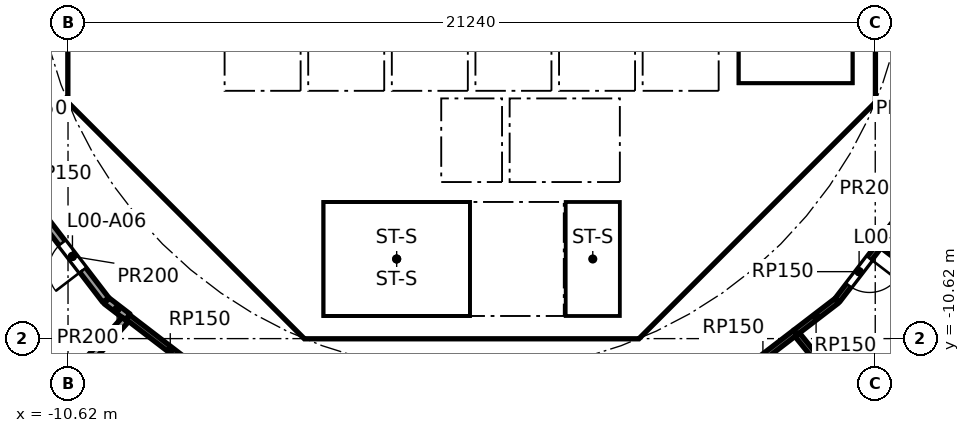
"""IFC4 building model, lengths in metres.
Left out: names, types, materials, properties, quantities, classifications, styles, units other than length and angle.
Written with IfcOpenShell. Run it as: python <this file> out.ifc"""

import sys

from ifc_helpers import new_model, si_unit, direction, frame, frame_2d, origin, place, context, subcontext, project, spatial, polyline, rectangle, outline, extrude, element, fill, save


model = new_model("IFC4")
c1 = context("Model", 3, precision=1e-05, world=origin(), true_north=direction((0.0, 1.0)))
c2 = subcontext(c1, "Body", "Model", "MODEL_VIEW")
j1 = project(units=[si_unit("LENGTHUNIT", "METRE"), si_unit("PLANEANGLEUNIT", "RADIAN")], contexts=[c1])
p1 = place(None, origin())
s1 = spatial("IfcSite", under=j1, at=p1, CompositionType="ELEMENT")
p2 = place(p1, origin())
s2 = spatial("IfcBuilding", under=s1, at=p2, CompositionType="ELEMENT")
p3 = place(p2, origin())
s3 = spatial("IfcBuildingStorey", under=s2, at=p3, CompositionType="ELEMENT", Elevation=0.0)
p4 = place(p3, frame((10.325, -3.801, 0.0), z_axis=(0.0, 0.0, 1.0), x_axis=(0.0, 1.0, 0.0)))
e1 = element("IfcWall", 1, at=p4, inside=s3, PredefinedType="SHEAR", context=c2, shape_type="SweptSolid", body=[
    extrude(rectangle(XDim=7.602, YDim=0.6, at=frame_2d((3.801, 0.0))), origin(), (0.0, 0.0, 1.0), 6.7),
])
p5 = place(p4, frame((6.351, 0.0, 0.0)))
e2 = element("IfcOpeningElement", 2, at=p5, cuts=e1, PredefinedType="OPENING", context=c2, shape_type="SweptSolid", body=[
    extrude(rectangle(XDim=1.1, YDim=2.1, at=frame_2d((0.55, 1.05))), frame((0.0, 0.31, 0.0), z_axis=(0.0, -1.0, 0.0), x_axis=(1.0, 0.0, 0.0)), (0.0, 0.0, 1.0), 0.62),
])
p6 = place(p3, frame((-10.325, 3.801, 0.0), z_axis=(0.0, 0.0, 1.0), x_axis=(0.0, -1.0, 0.0)))
e3 = element("IfcWall", 3, at=p6, inside=s3, PredefinedType="SHEAR", context=c2, shape_type="SweptSolid", body=[
    extrude(rectangle(XDim=7.602, YDim=0.6, at=frame_2d((3.801, 0.0))), origin(), (0.0, 0.0, 1.0), 6.7),
])
p7 = place(p6, frame((0.651, 0.0, 0.0)))
e4 = element("IfcOpeningElement", 4, at=p7, cuts=e3, PredefinedType="OPENING", context=c2, shape_type="SweptSolid", body=[
    extrude(rectangle(XDim=1.5, YDim=2.1, at=frame_2d((0.75, 1.05))), frame((0.0, 0.31, 0.0), z_axis=(0.0, -1.0, 0.0), x_axis=(1.0, 0.0, 0.0)), (0.0, 0.0, 1.0), 0.62),
])
p8 = place(p6, frame((5.451, 0.0, 0.0)))
e5 = element("IfcOpeningElement", 5, at=p8, cuts=e3, PredefinedType="OPENING", context=c2, shape_type="SweptSolid", body=[
    extrude(rectangle(XDim=1.5, YDim=2.1, at=frame_2d((0.75, 1.05))), frame((0.0, 0.31, 0.0), z_axis=(0.0, -1.0, 0.0), x_axis=(1.0, 0.0, 0.0)), (0.0, 0.0, 1.0), 0.62),
])
p9 = place(p3, frame((-9.988, -4.613, 0.0), z_axis=(0.0, 0.0, 1.0), x_axis=(0.707106781187, -0.707106781187, 0.0)))
e6 = element("IfcWall", 6, at=p9, inside=s3, PredefinedType="SHEAR", context=c2, shape_type="SweptSolid", body=[
    extrude(rectangle(XDim=7.602, YDim=0.6, at=frame_2d((3.801, 0.0))), origin(), (0.0, 0.0, 1.0), 6.7),
])
p10 = place(p9, frame((6.151, 0.0, 0.0)))
e7 = element("IfcOpeningElement", 7, at=p10, cuts=e6, PredefinedType="OPENING", context=c2, shape_type="SweptSolid", body=[
    extrude(rectangle(XDim=1.1, YDim=2.1, at=frame_2d((0.55, 1.05))), frame((0.0, 0.31, 0.0), z_axis=(0.0, -1.0, 0.0), x_axis=(1.0, 0.0, 0.0)), (0.0, 0.0, 1.0), 0.62),
])
p11 = place(p3, frame((-3.801, -10.325, 0.0), z_axis=(0.0, 0.0, 1.0), x_axis=(1.0, 0.0, 0.0)))
e8 = element("IfcWall", 8, at=p11, inside=s3, PredefinedType="SHEAR", context=c2, shape_type="SweptSolid", body=[
    extrude(rectangle(XDim=7.602, YDim=0.6, at=frame_2d((3.801, 0.0))), origin(), (0.0, 0.0, 1.0), 6.7),
])
p12 = place(p11, frame((6.351, 0.0, 0.0)))
e9 = element("IfcOpeningElement", 9, at=p12, cuts=e8, PredefinedType="OPENING", context=c2, shape_type="SweptSolid", body=[
    extrude(rectangle(XDim=1.1, YDim=2.1, at=frame_2d((0.55, 1.05))), frame((0.0, 0.31, 0.0), z_axis=(0.0, -1.0, 0.0), x_axis=(1.0, 0.0, 0.0)), (0.0, 0.0, 1.0), 0.62),
])
p13 = place(p3, frame((4.613, -9.988, 0.0), z_axis=(0.0, 0.0, 1.0), x_axis=(0.707106781187, 0.707106781187, 0.0)))
e10 = element("IfcWall", 10, at=p13, inside=s3, PredefinedType="SHEAR", context=c2, shape_type="SweptSolid", body=[
    extrude(rectangle(XDim=7.602, YDim=0.6, at=frame_2d((3.801, 0.0))), origin(), (0.0, 0.0, 1.0), 6.7),
])
p14 = place(p13, frame((3.201, 0.0, 0.0)))
e11 = element("IfcOpeningElement", 11, at=p14, cuts=e10, PredefinedType="OPENING", context=c2, shape_type="SweptSolid", body=[
    extrude(rectangle(XDim=1.2, YDim=2.1, at=frame_2d((0.6, 1.05))), frame((0.0, 0.31, 0.0), z_axis=(0.0, -1.0, 0.0), x_axis=(1.0, 0.0, 0.0)), (0.0, 0.0, 1.0), 0.62),
])
p15 = place(p3, frame((4.0, -10.025, 0.0), z_axis=(0.0, 0.0, 1.0), x_axis=(0.0, 1.0, 0.0)))
e12 = element("IfcWall", 12, at=p15, inside=s3, PredefinedType="SOLIDWALL", context=c2, shape_type="SweptSolid", body=[
    extrude(rectangle(XDim=3.0, YDim=0.2, at=frame_2d((1.5, 0.0))), origin(), (0.0, 0.0, 1.0), 6.7),
])
p16 = place(p15, frame((0.975, 0.0, 0.0)))
e13 = element("IfcOpeningElement", 13, at=p16, cuts=e12, PredefinedType="OPENING", context=c2, shape_type="SweptSolid", body=[
    extrude(rectangle(XDim=1.1, YDim=2.1, at=frame_2d((0.55, 1.05))), frame((0.0, 0.11, 0.0), z_axis=(0.0, -1.0, 0.0), x_axis=(1.0, 0.0, 0.0)), (0.0, 0.0, 1.0), 0.22),
])
p17 = place(p3, frame((-5.8, -8.227, 0.0), z_axis=(0.0, 0.0, 1.0), x_axis=(0.0, 1.0, 0.0)))
e14 = element("IfcWall", 14, at=p17, inside=s3, PredefinedType="PARTITIONING", context=c2, shape_type="SweptSolid", body=[
    extrude(rectangle(XDim=3.927, YDim=0.15, at=frame_2d((1.963, 0.0))), origin(), (0.0, 0.0, 1.0), 6.7),
])
p18 = place(p17, frame((2.615, 0.0, 0.0)))
e15 = element("IfcOpeningElement", 15, at=p18, cuts=e14, PredefinedType="OPENING", context=c2, shape_type="SweptSolid", body=[
    extrude(rectangle(XDim=0.9, YDim=2.1, at=frame_2d((0.45, 1.05))), frame((0.0, 0.085, 0.0), z_axis=(0.0, -1.0, 0.0), x_axis=(1.0, 0.0, 0.0)), (0.0, 0.0, 1.0), 0.17),
])
p19 = place(p17, frame((0.539, 0.0, 0.0)))
e16 = element("IfcOpeningElement", 16, at=p19, cuts=e14, PredefinedType="OPENING", context=c2, shape_type="SweptSolid", body=[
    extrude(rectangle(XDim=0.9, YDim=2.1, at=frame_2d((0.45, 1.05))), frame((0.0, 0.085, 0.0), z_axis=(0.0, -1.0, 0.0), x_axis=(1.0, 0.0, 0.0)), (0.0, 0.0, 1.0), 0.17),
])
p20 = place(p3, frame((4.0, -6.5, 0.0), z_axis=(0.0, 0.0, 1.0), x_axis=(0.0, 1.0, 0.0)))
e17 = element("IfcWall", 17, at=p20, inside=s3, PredefinedType="SOLIDWALL", context=c2, shape_type="SweptSolid", body=[
    extrude(rectangle(XDim=2.2, YDim=0.2, at=frame_2d((1.1, 0.0))), origin(), (0.0, 0.0, 1.0), 6.7),
])
p21 = place(p20, frame((0.55, 0.0, 0.0)))
e18 = element("IfcOpeningElement", 18, at=p21, cuts=e17, PredefinedType="OPENING", context=c2, shape_type="SweptSolid", body=[
    extrude(rectangle(XDim=1.1, YDim=2.1, at=frame_2d((0.55, 1.05))), frame((0.0, 0.11, 0.0), z_axis=(0.0, -1.0, 0.0), x_axis=(1.0, 0.0, 0.0)), (0.0, 0.0, 1.0), 0.22),
])
p22 = place(p3, frame((-4.0, -6.5, 0.0), z_axis=(0.0, 0.0, 1.0), x_axis=(0.0, 1.0, 0.0)))
e19 = element("IfcWall", 19, at=p22, inside=s3, PredefinedType="SOLIDWALL", context=c2, shape_type="SweptSolid", body=[
    extrude(rectangle(XDim=2.2, YDim=0.2, at=frame_2d((1.1, 0.0))), origin(), (0.0, 0.0, 1.0), 6.7),
])
p23 = place(p22, frame((0.65, 0.0, 0.0)))
e20 = element("IfcOpeningElement", 20, at=p23, cuts=e19, PredefinedType="OPENING", context=c2, shape_type="SweptSolid", body=[
    extrude(rectangle(XDim=0.9, YDim=2.1, at=frame_2d((0.45, 1.05))), frame((0.0, 0.11, 0.0), z_axis=(0.0, -1.0, 0.0), x_axis=(1.0, 0.0, 0.0)), (0.0, 0.0, 1.0), 0.22),
])
p24 = place(p3, origin())
e21 = element("IfcWall", 21, at=p24, inside=s3, PredefinedType="SHEAR", context=c2, shape_type="SweptSolid", body=[
    extrude(outline(polyline([(-10.625, -3.801), (-10.025, -3.801), (-10.025, -4.152), (-9.776, -4.401), (-10.2, -4.825), (-10.625, -4.401), (-10.625, -3.801)])), origin(), (0.0, 0.0, 1.0), 6.7),
])
p25 = place(p3, origin())
e22 = element("IfcWall", 22, at=p25, inside=s3, PredefinedType="SHEAR", context=c2, shape_type="SweptSolid", body=[
    extrude(outline(polyline([(-4.825, -10.2), (-4.401, -9.776), (-4.152, -10.025), (-3.801, -10.025), (-3.801, -10.625), (-4.401, -10.625), (-4.825, -10.2)])), origin(), (0.0, 0.0, 1.0), 6.7),
])
p26 = place(p3, origin())
e23 = element("IfcWall", 23, at=p26, inside=s3, PredefinedType="SHEAR", context=c2, shape_type="SweptSolid", body=[
    extrude(outline(polyline([(3.801, -10.625), (3.801, -10.025), (4.152, -10.025), (4.401, -9.776), (4.825, -10.2), (4.401, -10.625), (3.801, -10.625)])), origin(), (0.0, 0.0, 1.0), 6.7),
])
p27 = place(p3, origin())
e24 = element("IfcWall", 24, at=p27, inside=s3, PredefinedType="SHEAR", context=c2, shape_type="SweptSolid", body=[
    extrude(outline(polyline([(10.2, -4.825), (9.776, -4.401), (10.025, -4.152), (10.025, -3.801), (10.625, -3.801), (10.625, -4.401), (10.2, -4.825)])), origin(), (0.0, 0.0, 1.0), 6.7),
])
for number, where, z_axis, x_axis in (
    (25, (-0.9, -6.5, 0.0), (0.0, 0.0, 1.0), (0.0, 1.0, 0.0)),
    (26, (0.9, -6.5, 0.0), (0.0, 0.0, 1.0), (0.0, 1.0, 0.0)),
):
    element("IfcWall", number, at=place(p3, frame(where, z_axis=z_axis, x_axis=x_axis)), inside=s3, PredefinedType="SOLIDWALL", context=c2, shape_type="SweptSolid", body=[
        extrude(rectangle(XDim=2.2, YDim=0.2, at=frame_2d((1.1, 0.0))), origin(), (0.0, 0.0, 1.0), 6.7),
    ])
p28 = place(p3, origin())
e27 = element("IfcWall", 27, at=p28, inside=s3, PredefinedType="SOLIDWALL", context=c2, shape_type="SweptSolid", body=[
    extrude(outline(polyline([(-6.7, -2.1), (-6.5, -2.1), (-6.5, -4.1), (-4.5, -4.1), (-4.5, -2.1), (-4.3, -2.1), (-4.3, -4.1), (-2.3, -4.1), (-2.3, -2.1), (-2.1, -2.1), (-2.1, -4.1), (-0.1, -4.1), (-0.1, -2.1), (0.1, -2.1), (0.1, -4.1), (2.1, -4.1), (2.1, -2.1), (2.3, -2.1), (2.3, -4.1), (4.3, -4.1), (4.3, -2.1), (4.5, -2.1), (4.5, -4.1), (6.5, -4.1), (6.5, -2.1), (6.7, -2.1), (6.7, -4.3), (-6.7, -4.3), (-6.7, -2.1)])), origin(), (0.0, 0.0, 1.0), 6.7),
])
p29 = place(p3, frame((-10.025, -4.0, 0.0), z_axis=(0.0, 0.0, 1.0), x_axis=(1.0, 0.0, 0.0)))
e28 = element("IfcWall", 28, at=p29, inside=s3, PredefinedType="PARTITIONING", context=c2, shape_type="SweptSolid", body=[
    extrude(rectangle(XDim=3.325, YDim=0.2, at=frame_2d((1.662, 0.0))), origin(), (0.0, 0.0, 1.0), 6.7),
])
p30 = place(p3, frame((-8.001, -6.1, 0.0), z_axis=(0.0, 0.0, 1.0), x_axis=(1.0, 0.0, 0.0)))
e29 = element("IfcWall", 29, at=p30, inside=s3, PredefinedType="PARTITIONING", context=c2, shape_type="SweptSolid", body=[
    extrude(rectangle(XDim=2.126, YDim=0.15, at=frame_2d((1.063, 0.0))), origin(), (0.0, 0.0, 1.0), 6.7),
])
p31 = place(p3, origin())
e30 = element("IfcWall", 30, at=p31, inside=s3, PredefinedType="SOLIDWALL", context=c2, shape_type="SweptSolid", body=[
    extrude(outline(polyline([(-3.9, -10.025), (-4.1, -10.025), (-4.1, -7.025), (-3.9, -7.025), (-3.9, -10.025)])), origin(), (0.0, 0.0, 1.0), 6.7),
])
p32 = place(p3, origin())
e31 = element("IfcWall", 31, at=p32, inside=s3, PredefinedType="SOLIDWALL", context=c2, shape_type="SweptSolid", body=[
    extrude(outline(polyline([(4.1, -7.025), (-4.1, -7.025), (-4.1, -6.5), (4.1, -6.5), (4.1, -7.025)])), origin(), (0.0, 0.0, 1.0), 6.7),
])
p33 = place(p3, origin())
e32 = element("IfcWall", 32, at=p33, inside=s3, PredefinedType="SOLIDWALL", context=c2, shape_type="SweptSolid", body=[
    extrude(outline(polyline([(7.025, -3.9), (6.7, -3.9), (6.7, 3.9), (7.025, 3.9), (7.025, -3.9)])), origin(), (0.0, 0.0, 1.0), 6.7),
])
p34 = place(p3, origin())
e33 = element("IfcWall", 33, at=p34, inside=s3, PredefinedType="SOLIDWALL", context=c2, shape_type="SweptSolid", body=[
    extrude(outline(polyline([(10.025, -4.1), (6.7, -4.1), (6.7, -3.9), (10.025, -3.9), (10.025, -4.1)])), origin(), (0.0, 0.0, 1.0), 6.7),
])
p35 = place(p3, frame((-9.05, -10.051, 0.0), z_axis=(0.0, 0.0, 1.0), x_axis=(0.793365630445, -0.608745411834, 0.0)))
e34 = element("IfcWall", 34, at=p35, inside=s3, PredefinedType="PARTITIONING", context=c2, shape_type="SweptSolid", body=[
    extrude(rectangle(XDim=2.825, YDim=0.15, at=frame_2d((1.412, 0.0))), origin(), (0.0, 0.0, 1.0), 6.7),
])
p36 = place(p3, frame((8.519, -10.459, 0.0), z_axis=(0.0, 0.0, 1.0), x_axis=(-0.793372937326, -0.608735888805, 0.0)))
e35 = element("IfcWall", 35, at=p36, inside=s3, PredefinedType="PARTITIONING", context=c2, shape_type="SweptSolid", body=[
    extrude(rectangle(XDim=2.155, YDim=0.15, at=frame_2d((1.078, 0.0))), origin(), (0.0, 0.0, 1.0), 6.7),
])
p37 = place(p3, frame((9.607, -9.624, 0.0), z_axis=(0.0, 0.0, 1.0), x_axis=(-0.793371316762, -0.6087380009, 0.0)))
e36 = element("IfcWall", 36, at=p37, inside=s3, PredefinedType="PARTITIONING", context=c2, shape_type="SweptSolid", body=[
    extrude(rectangle(XDim=1.371, YDim=0.15, at=frame_2d((0.686, 0.0))), origin(), (0.0, 0.0, 1.0), 6.7),
])
p38 = place(p3, frame((10.336, -12.689, 0.0), z_axis=(0.0, 0.0, 1.0), x_axis=(-0.631537140908, 0.775345625934, 0.0)))
e37 = element("IfcWall", 37, at=p38, inside=s3, PredefinedType="PARTITIONING", context=c2, shape_type="SweptSolid", body=[
    extrude(rectangle(XDim=2.801, YDim=0.15, at=frame_2d((1.401, 0.0))), origin(), (0.0, 0.0, 1.0), 6.7),
])
p39 = place(p3, frame((10.774, -8.109, 0.0), z_axis=(0.0, 0.0, 1.0), x_axis=(-0.608754453805, -0.793358692504, 0.0)))
e38 = element("IfcWall", 38, at=p39, inside=s3, PredefinedType="PARTITIONING", context=c2, shape_type="SweptSolid", body=[
    extrude(rectangle(XDim=1.888, YDim=0.15, at=frame_2d((0.944, 0.0))), origin(), (0.0, 0.0, 1.0), 6.7),
])
p40 = place(p39, frame((0.5, 0.0, 0.0)))
e39 = element("IfcOpeningElement", 39, at=p40, cuts=e38, PredefinedType="OPENING", context=c2, shape_type="SweptSolid", body=[
    extrude(rectangle(XDim=0.9, YDim=2.1, at=frame_2d((0.45, 1.05))), frame((0.0, 0.085, 0.0), z_axis=(0.0, -1.0, 0.0), x_axis=(1.0, 0.0, 0.0)), (0.0, 0.0, 1.0), 0.17),
])
p41 = place(p3, frame((-11.39, -7.305, 0.0), z_axis=(0.0, 0.0, 1.0), x_axis=(0.60873741789, -0.793371764094, 0.0)))
e40 = element("IfcWall", 40, at=p41, inside=s3, PredefinedType="PARTITIONING", context=c2, shape_type="SweptSolid", body=[
    extrude(rectangle(XDim=2.898, YDim=0.2, at=frame_2d((1.449, 0.0))), origin(), (0.0, 0.0, 1.0), 6.7),
])
p42 = place(p41, frame((1.007, 0.0, 0.0)))
e41 = element("IfcOpeningElement", 41, at=p42, cuts=e40, PredefinedType="OPENING", context=c2, shape_type="SweptSolid", body=[
    extrude(rectangle(XDim=0.9, YDim=2.1, at=frame_2d((0.45, 1.05))), frame((0.0, 0.11, 0.0), z_axis=(0.0, -1.0, 0.0), x_axis=(1.0, 0.0, 0.0)), (0.0, 0.0, 1.0), 0.22),
])
p43 = place(p3, frame((-9.605, -9.626, 0.0), z_axis=(0.0, 0.0, 1.0), x_axis=(0.793454504248, -0.608629566887, 0.0)))
e42 = element("IfcWall", 42, at=p43, inside=s3, PredefinedType="PARTITIONING", context=c2, shape_type="SweptSolid", body=[
    extrude(rectangle(XDim=0.699, YDim=0.2, at=frame_2d((0.349, 0.0))), origin(), (0.0, 0.0, 1.0), 6.7),
])
p44 = place(p3, frame((-9.117, -10.126, 0.0), z_axis=(0.0, 0.0, 1.0), x_axis=(-0.669134044303, -0.743141729925, 0.0)))
e43 = element("IfcWall", 43, at=p44, inside=s3, PredefinedType="PARTITIONING", context=c2, shape_type="SweptSolid", body=[
    extrude(rectangle(XDim=5.417, YDim=0.2, at=frame_2d((2.708, 0.0))), origin(), (0.0, 0.0, 1.0), 6.7),
])
p45 = place(p3, frame((10.774, -8.109, 0.0), z_axis=(0.0, 0.0, 1.0), x_axis=(0.608663561698, 0.79342842693, 0.0)))
e44 = element("IfcWall", 44, at=p45, inside=s3, PredefinedType="PARTITIONING", context=c2, shape_type="SweptSolid", body=[
    extrude(rectangle(XDim=1.635, YDim=0.2, at=frame_2d((0.817, 0.0))), origin(), (0.0, 0.0, 1.0), 6.7),
])
p46 = place(p3, frame((25.788, -19.41, 0.0), z_axis=(0.0, 0.0, 1.0), x_axis=(-0.798975382821, 0.601363731568, 0.0)))
e45 = element("IfcWall", 45, at=p46, inside=s3, PredefinedType="PARTITIONING", context=c2, shape_type="SweptSolid", body=[
    extrude(rectangle(XDim=18.692, YDim=0.2, at=frame_2d((9.346, 0.0))), origin(), (0.0, 0.0, 1.0), 6.7),
])
p47 = place(p21, origin())
e46 = element("IfcDoor", 46, at=p47, inside=s3, OperationType="DOUBLE_DOOR_SLIDING", PredefinedType="DOOR", context=c2, shape_type="SweptSolid", body=[
    extrude(rectangle(XDim=1.1, YDim=2.1, at=frame_2d((0.55, 1.05))), frame((0.0, 0.025, 0.0), z_axis=(0.0, -1.0, 0.0), x_axis=(1.0, 0.0, 0.0)), (0.0, 0.0, 1.0), 0.05),
])
fill(e18, e46)
p48 = place(p16, origin())
e47 = element("IfcDoor", 47, at=p48, inside=s3, OperationType="SINGLE_SWING_RIGHT", PredefinedType="DOOR", context=c2, shape_type="SweptSolid", body=[
    extrude(rectangle(XDim=1.1, YDim=2.1, at=frame_2d((0.55, 1.05))), frame((0.0, 0.025, 0.0), z_axis=(0.0, -1.0, 0.0), x_axis=(1.0, 0.0, 0.0)), (0.0, 0.0, 1.0), 0.05),
])
fill(e13, e47)
p49 = place(p18, origin())
e48 = element("IfcDoor", 48, at=p49, inside=s3, OperationType="SINGLE_SWING_RIGHT", PredefinedType="DOOR", context=c2, shape_type="SweptSolid", body=[
    extrude(rectangle(XDim=0.9, YDim=2.1, at=frame_2d((0.45, 1.05))), frame((0.0, 0.025, 0.0), z_axis=(0.0, -1.0, 0.0), x_axis=(1.0, 0.0, 0.0)), (0.0, 0.0, 1.0), 0.05),
])
fill(e15, e48)
p50 = place(p19, origin())
e49 = element("IfcDoor", 49, at=p50, inside=s3, OperationType="SINGLE_SWING_RIGHT", PredefinedType="DOOR", context=c2, shape_type="SweptSolid", body=[
    extrude(rectangle(XDim=0.9, YDim=2.1, at=frame_2d((0.45, 1.05))), frame((0.0, 0.025, 0.0), z_axis=(0.0, -1.0, 0.0), x_axis=(1.0, 0.0, 0.0)), (0.0, 0.0, 1.0), 0.05),
])
fill(e16, e49)
p51 = place(p23, frame((0.9, 0.0, 0.0), x_axis=(-1.0, 0.0, 0.0)))
e50 = element("IfcDoor", 50, at=p51, inside=s3, OperationType="SINGLE_SWING_RIGHT", PredefinedType="DOOR", context=c2, shape_type="SweptSolid", body=[
    extrude(rectangle(XDim=0.9, YDim=2.1, at=frame_2d((0.45, 1.05))), frame((0.0, 0.025, 0.0), z_axis=(0.0, -1.0, 0.0), x_axis=(1.0, 0.0, 0.0)), (0.0, 0.0, 1.0), 0.05),
])
fill(e20, e50)
p52 = place(p14, origin())
e51 = element("IfcDoor", 51, at=p52, inside=s3, OperationType="SINGLE_SWING_LEFT", PredefinedType="DOOR", context=c2, shape_type="SweptSolid", body=[
    extrude(rectangle(XDim=1.2, YDim=2.1, at=frame_2d((0.6, 1.05))), frame((0.0, 0.025, 0.0), z_axis=(0.0, -1.0, 0.0), x_axis=(1.0, 0.0, 0.0)), (0.0, 0.0, 1.0), 0.05),
])
fill(e11, e51)
p53 = place(p8, origin())
e52 = element("IfcDoor", 52, at=p53, inside=s3, OperationType="DOUBLE_DOOR_SINGLE_SWING", PredefinedType="DOOR", context=c2, shape_type="SweptSolid", body=[
    extrude(rectangle(XDim=1.5, YDim=2.1, at=frame_2d((0.75, 1.05))), frame((0.0, 0.025, 0.0), z_axis=(0.0, -1.0, 0.0), x_axis=(1.0, 0.0, 0.0)), (0.0, 0.0, 1.0), 0.05),
])
fill(e5, e52)
p54 = place(p10, origin())
e53 = element("IfcDoor", 53, at=p54, inside=s3, OperationType="SINGLE_SWING_LEFT", PredefinedType="DOOR", context=c2, shape_type="SweptSolid", body=[
    extrude(rectangle(XDim=1.1, YDim=2.1, at=frame_2d((0.55, 1.05))), frame((0.0, 0.025, 0.0), z_axis=(0.0, -1.0, 0.0), x_axis=(1.0, 0.0, 0.0)), (0.0, 0.0, 1.0), 0.05),
])
fill(e7, e53)
p55 = place(p12, frame((1.1, 0.0, 0.0), x_axis=(-1.0, 0.0, 0.0)))
e54 = element("IfcDoor", 54, at=p55, inside=s3, OperationType="SINGLE_SWING_RIGHT", PredefinedType="DOOR", context=c2, shape_type="SweptSolid", body=[
    extrude(rectangle(XDim=1.1, YDim=2.1, at=frame_2d((0.55, 1.05))), frame((0.0, 0.025, 0.0), z_axis=(0.0, -1.0, 0.0), x_axis=(1.0, 0.0, 0.0)), (0.0, 0.0, 1.0), 0.05),
])
fill(e9, e54)
p56 = place(p42, frame((0.9, 0.0, 0.0), x_axis=(-1.0, 0.0, 0.0)))
e55 = element("IfcDoor", 55, at=p56, inside=s3, OperationType="SINGLE_SWING_LEFT", PredefinedType="DOOR", context=c2, shape_type="SweptSolid", body=[
    extrude(rectangle(XDim=0.9, YDim=2.1, at=frame_2d((0.45, 1.05))), frame((0.0, 0.025, 0.0), z_axis=(0.0, -1.0, 0.0), x_axis=(1.0, 0.0, 0.0)), (0.0, 0.0, 1.0), 0.05),
])
fill(e41, e55)
p57 = place(p40, origin())
e56 = element("IfcDoor", 56, at=p57, inside=s3, OperationType="SINGLE_SWING_LEFT", PredefinedType="DOOR", context=c2, shape_type="SweptSolid", body=[
    extrude(rectangle(XDim=0.9, YDim=2.1, at=frame_2d((0.45, 1.05))), frame((0.0, 0.025, 0.0), z_axis=(0.0, -1.0, 0.0), x_axis=(1.0, 0.0, 0.0)), (0.0, 0.0, 1.0), 0.05),
])
fill(e39, e56)
save(model, sys.argv[1])
